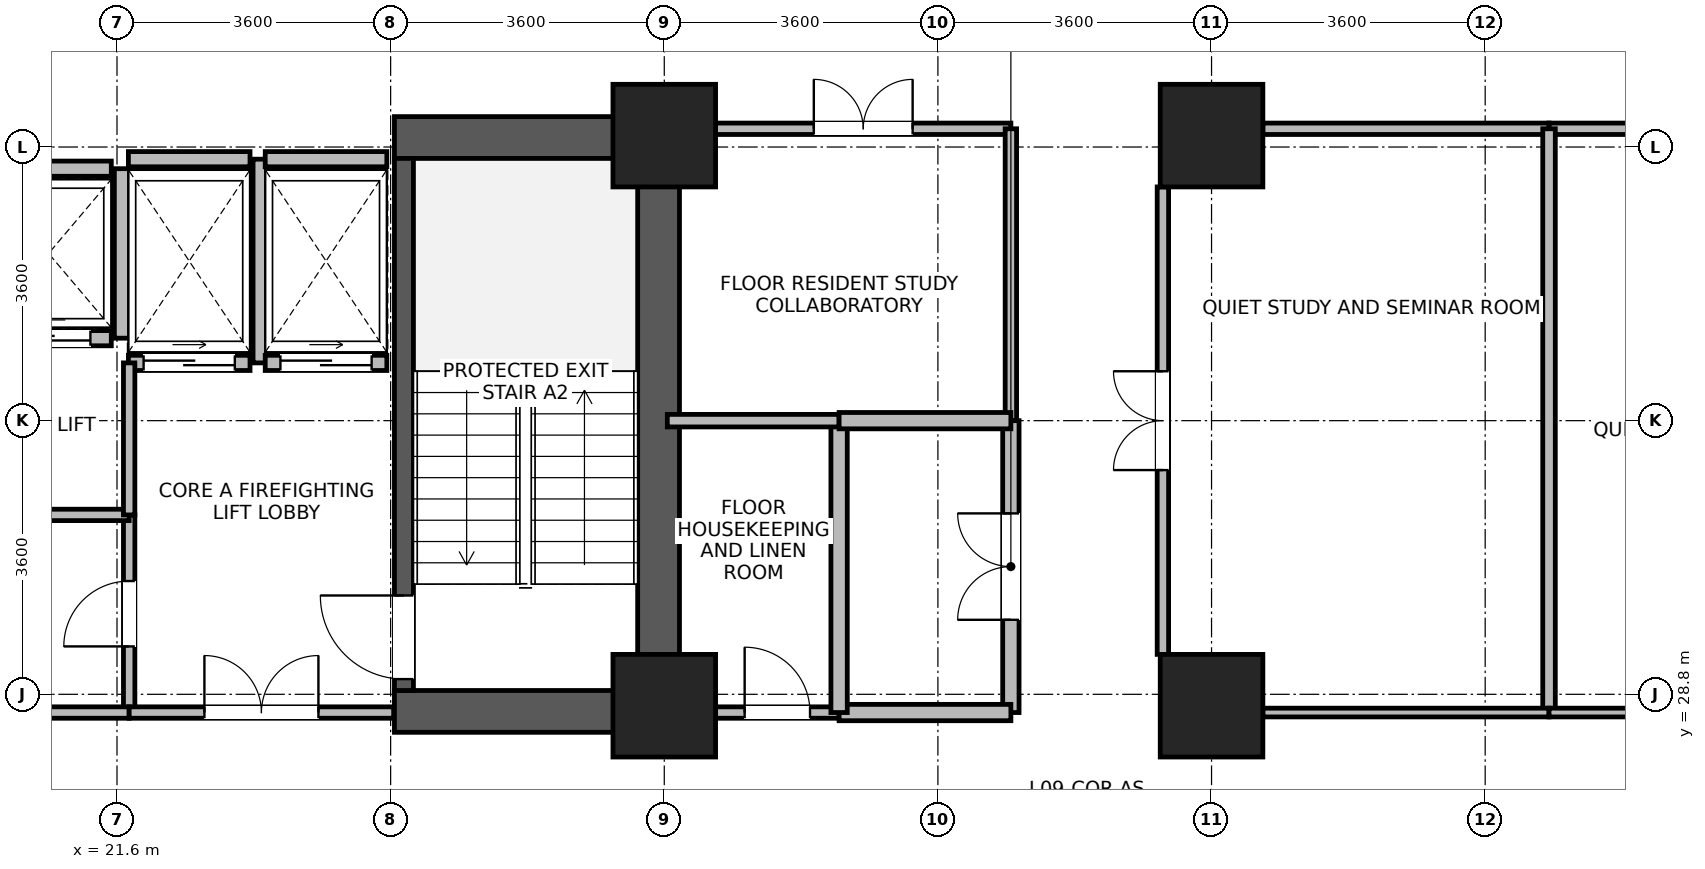
"""IFC4 building model, lengths in metres.
Left out: names, types, materials, properties, quantities, classifications, styles, units other than length and angle.
Written with IfcOpenShell. Run it as: python <this file> out.ifc"""

import sys

from ifc_helpers import new_model, si_unit, direction, frame, frame_2d, origin, origin_2d, place, context, subcontext, project, spatial, rectangle, extrude, source, transform, mapped, element, fill, save


model = new_model("IFC4")
c1 = context("Model", 3, precision=1e-05, world=origin(), true_north=direction((0.0, 1.0)))
c2 = subcontext(c1, "Body", "Model", "MODEL_VIEW")
j1 = project(units=[si_unit("LENGTHUNIT", "METRE"), si_unit("PLANEANGLEUNIT", "RADIAN")], contexts=[c1])
p1 = place(None, origin())
s1 = spatial("IfcSite", under=j1, at=p1, CompositionType="ELEMENT")
p2 = place(p1, origin())
s2 = spatial("IfcBuilding", under=s1, at=p2, CompositionType="ELEMENT")
p3 = place(p2, frame((0.0, 0.0, 40.1)))
s3 = spatial("IfcBuildingStorey", under=s2, at=p3, CompositionType="ELEMENT", Elevation=40.1)
p4 = place(p3, frame((28.725, 28.3, 0.0), z_axis=(0.0, 0.0, 1.0), x_axis=(0.0, 1.0, 0.0)))
e1 = element("IfcWall", 1, at=p4, inside=s3, PredefinedType="SHEAR", context=c2, shape_type="SweptSolid", body=[
    extrude(rectangle(XDim=8.1, YDim=0.55, at=frame_2d((4.05, 0.0))), origin(), (0.0, 0.0, 1.0), 3.45),
])
for number, where, z_axis, x_axis in (
    (2, (25.25, 28.575, 0.0), (0.0, 0.0, 1.0), (1.0, 0.0, 0.0)),
    (3, (25.25, 36.125, 0.0), (0.0, 0.0, 1.0), (1.0, 0.0, 0.0)),
):
    element("IfcWall", number, at=place(p3, frame(where, z_axis=z_axis, x_axis=x_axis)), inside=s3, PredefinedType="SHEAR", context=c2, shape_type="SweptSolid", body=[
        extrude(rectangle(XDim=3.2, YDim=0.55, at=frame_2d((1.6, 0.0))), origin(), (0.0, 0.0, 1.0), 3.45),
    ])
p5 = place(p3, frame((25.375, 28.85, 0.0), z_axis=(0.0, 0.0, 1.0), x_axis=(0.0, 1.0, 0.0)))
e4 = element("IfcWall", 4, at=p5, inside=s3, PredefinedType="SHEAR", context=c2, shape_type="SweptSolid", body=[
    extrude(rectangle(XDim=7.0, YDim=0.25, at=frame_2d((3.5, 0.0))), origin(), (0.0, 0.0, 1.0), 3.45),
])
p6 = place(p5, frame((0.15, 0.0, 0.0)))
e5 = element("IfcOpeningElement", 5, at=p6, cuts=e4, PredefinedType="OPENING", context=c2, shape_type="SweptSolid", body=[
    extrude(rectangle(XDim=1.1, YDim=2.08, at=frame_2d((0.55, 1.04))), frame((0.0, 0.135, 0.0), z_axis=(0.0, -1.0, 0.0), x_axis=(1.0, 0.0, 0.0)), (0.0, 0.0, 1.0), 0.27),
])
m1 = source(origin(), c2, "Body", "SweptSolid", [
    extrude(rectangle(XDim=1.35, YDim=1.35, at=origin_2d()), origin(), (0.0, 0.0, 1.0), 3.7),
])
for number, where, z_axis, x_axis in (
    (6, (28.8, 28.65, 0.0), (0.0, 0.0, 1.0), (1.0, 0.0, 0.0)),
    (7, (28.8, 36.15, 0.0), (0.0, 0.0, 1.0), (1.0, 0.0, 0.0)),
    (8, (36.0, 28.65, 0.0), (0.0, 0.0, 1.0), (1.0, 0.0, 0.0)),
    (9, (36.0, 36.15, 0.0), (0.0, 0.0, 1.0), (1.0, 0.0, 0.0)),
):
    element("IfcColumn", number, at=place(p3, frame(where, z_axis=z_axis, x_axis=x_axis)), inside=s3, PredefinedType="COLUMN", context=c2, shape_type="MappedRepresentation", body=[
        mapped(m1, transform((0.0, 0.0, 0.0), x_axis=(1.0, 0.0, 0.0), y_axis=(0.0, 1.0, 0.0), z_axis=(0.0, 0.0, 1.0), scale=1.0)),
    ])
p7 = place(p3, frame((19.875, 33.485, 0.0), z_axis=(0.0, 0.0, 1.0), x_axis=(1.0, 0.0, 0.0)))
e10 = element("IfcWall", 10, at=p7, inside=s3, PredefinedType="PARTITIONING", context=c2, shape_type="SweptSolid", body=[
    extrude(rectangle(XDim=1.65, YDim=0.2, at=frame_2d((0.825, 0.0))), origin(), (0.0, 0.0, 1.0), 3.43),
])
p8 = place(p7, frame((0.275, 0.0, 0.0)))
e11 = element("IfcOpeningElement", 11, at=p8, cuts=e10, PredefinedType="OPENING", context=c2, shape_type="SweptSolid", body=[
    extrude(rectangle(XDim=1.1, YDim=2.12, at=frame_2d((0.55, 1.06))), frame((0.0, 0.11, 0.0), z_axis=(0.0, -1.0, 0.0), x_axis=(1.0, 0.0, 0.0)), (0.0, 0.0, 1.0), 0.22),
])
p9 = place(p3, frame((19.875, 35.715, 0.0), z_axis=(0.0, 0.0, 1.0), x_axis=(1.0, 0.0, 0.0)))
e12 = element("IfcWall", 12, at=p9, inside=s3, PredefinedType="PARTITIONING", context=c2, shape_type="SweptSolid", body=[
    extrude(rectangle(XDim=1.65, YDim=0.2, at=frame_2d((0.825, 0.0))), origin(), (0.0, 0.0, 1.0), 2.23),
])
p10 = place(p3, frame((21.665, 33.485, 0.0), z_axis=(0.0, 0.0, 1.0), x_axis=(0.0, 1.0, 0.0)))
e13 = element("IfcWall", 13, at=p10, inside=s3, PredefinedType="PARTITIONING", context=c2, shape_type="SweptSolid", body=[
    extrude(rectangle(XDim=2.23, YDim=0.2, at=frame_2d((1.115, 0.0))), origin(), (0.0, 0.0, 1.0), 3.43),
])
p11 = place(p3, frame((21.75, 33.16, 0.0), z_axis=(0.0, 0.0, 1.0), x_axis=(1.0, 0.0, 0.0)))
e14 = element("IfcWall", 14, at=p11, inside=s3, PredefinedType="PARTITIONING", context=c2, shape_type="SweptSolid", body=[
    extrude(rectangle(XDim=1.6, YDim=0.2, at=frame_2d((0.8, 0.0))), origin(), (0.0, 0.0, 1.0), 3.43),
])
p12 = place(p11, frame((0.2, 0.0, 0.0)))
e15 = element("IfcOpeningElement", 15, at=p12, cuts=e14, PredefinedType="OPENING", context=c2, shape_type="SweptSolid", body=[
    extrude(rectangle(XDim=1.2, YDim=2.12, at=frame_2d((0.6, 1.06))), frame((0.0, 0.11, 0.0), z_axis=(0.0, -1.0, 0.0), x_axis=(1.0, 0.0, 0.0)), (0.0, 0.0, 1.0), 0.22),
])
p13 = place(p3, frame((21.75, 35.84, 0.0), z_axis=(0.0, 0.0, 1.0), x_axis=(1.0, 0.0, 0.0)))
e16 = element("IfcWall", 16, at=p13, inside=s3, PredefinedType="PARTITIONING", context=c2, shape_type="SweptSolid", body=[
    extrude(rectangle(XDim=1.6, YDim=0.2, at=frame_2d((0.8, 0.0))), origin(), (0.0, 0.0, 1.0), 2.23),
])
p14 = place(p3, frame((23.49, 33.16, 0.0), z_axis=(0.0, 0.0, 1.0), x_axis=(0.0, 1.0, 0.0)))
e17 = element("IfcWall", 17, at=p14, inside=s3, PredefinedType="PARTITIONING", context=c2, shape_type="SweptSolid", body=[
    extrude(rectangle(XDim=2.68, YDim=0.2, at=frame_2d((1.34, 0.0))), origin(), (0.0, 0.0, 1.0), 3.43),
])
p15 = place(p3, frame((23.55, 33.16, 0.0), z_axis=(0.0, 0.0, 1.0), x_axis=(1.0, 0.0, 0.0)))
e18 = element("IfcWall", 18, at=p15, inside=s3, PredefinedType="PARTITIONING", context=c2, shape_type="SweptSolid", body=[
    extrude(rectangle(XDim=1.6, YDim=0.2, at=frame_2d((0.8, 0.0))), origin(), (0.0, 0.0, 1.0), 3.43),
])
p16 = place(p15, frame((0.2, 0.0, 0.0)))
e19 = element("IfcOpeningElement", 19, at=p16, cuts=e18, PredefinedType="OPENING", context=c2, shape_type="SweptSolid", body=[
    extrude(rectangle(XDim=1.2, YDim=2.12, at=frame_2d((0.6, 1.06))), frame((0.0, 0.11, 0.0), z_axis=(0.0, -1.0, 0.0), x_axis=(1.0, 0.0, 0.0)), (0.0, 0.0, 1.0), 0.22),
])
p17 = place(p3, frame((23.55, 35.84, 0.0), z_axis=(0.0, 0.0, 1.0), x_axis=(1.0, 0.0, 0.0)))
e20 = element("IfcWall", 20, at=p17, inside=s3, PredefinedType="PARTITIONING", context=c2, shape_type="SweptSolid", body=[
    extrude(rectangle(XDim=1.6, YDim=0.2, at=frame_2d((0.8, 0.0))), origin(), (0.0, 0.0, 1.0), 2.23),
])
p18 = place(p3, frame((35.36, 29.325, 0.0), z_axis=(0.0, 0.0, 1.0), x_axis=(0.0, 1.0, 0.0)))
e21 = element("IfcWall", 21, at=p18, inside=s3, PredefinedType="PARTITIONING", context=c2, shape_type="SweptSolid", body=[
    extrude(rectangle(XDim=6.15, YDim=0.15, at=frame_2d((3.075, 0.0))), origin(), (0.0, 0.0, 1.0), 3.43),
])
p19 = place(p18, frame((2.425, 0.0, 0.0)))
e22 = element("IfcOpeningElement", 22, at=p19, cuts=e21, PredefinedType="OPENING", context=c2, shape_type="SweptSolid", body=[
    extrude(rectangle(XDim=1.3, YDim=2.12, at=frame_2d((0.65, 1.06))), frame((0.0, 0.085, 0.0), z_axis=(0.0, -1.0, 0.0), x_axis=(1.0, 0.0, 0.0)), (0.0, 0.0, 1.0), 0.17),
])
p20 = place(p3, frame((36.675, 36.24, 0.0), z_axis=(0.0, 0.0, 1.0), x_axis=(1.0, 0.0, 0.0)))
e23 = element("IfcWall", 23, at=p20, inside=s3, PredefinedType="PARTITIONING", context=c2, shape_type="SweptSolid", body=[
    extrude(rectangle(XDim=3.765, YDim=0.15, at=frame_2d((1.882, 0.0))), origin(), (0.0, 0.0, 1.0), 2.78),
])
p21 = place(p3, frame((40.44, 36.24, 0.0), z_axis=(0.0, 0.0, 1.0), x_axis=(1.0, 0.0, 0.0)))
e24 = element("IfcWall", 24, at=p21, inside=s3, PredefinedType="PARTITIONING", context=c2, shape_type="SweptSolid", body=[
    extrude(rectangle(XDim=4.72, YDim=0.15, at=frame_2d((2.36, 0.0))), origin(), (0.0, 0.0, 1.0), 2.78),
])
p22 = place(p21, frame((1.71, 0.0, 0.0)))
e25 = element("IfcOpeningElement", 25, at=p22, cuts=e24, PredefinedType="OPENING", context=c2, shape_type="SweptSolid", body=[
    extrude(rectangle(XDim=1.3, YDim=2.12, at=frame_2d((0.65, 1.06))), frame((0.0, 0.085, 0.0), z_axis=(0.0, -1.0, 0.0), x_axis=(1.0, 0.0, 0.0)), (0.0, 0.0, 1.0), 0.17),
])
p23 = place(p3, frame((29.475, 36.24, 0.0), z_axis=(0.0, 0.0, 1.0), x_axis=(1.0, 0.0, 0.0)))
e26 = element("IfcWall", 26, at=p23, inside=s3, PredefinedType="PARTITIONING", context=c2, shape_type="SweptSolid", body=[
    extrude(rectangle(XDim=3.885, YDim=0.15, at=frame_2d((1.942, 0.0))), origin(), (0.0, 0.0, 1.0), 2.78),
])
p24 = place(p23, frame((1.292, 0.0, 0.0)))
e27 = element("IfcOpeningElement", 27, at=p24, cuts=e26, PredefinedType="OPENING", context=c2, shape_type="SweptSolid", body=[
    extrude(rectangle(XDim=1.3, YDim=2.12, at=frame_2d((0.65, 1.06))), frame((0.0, 0.085, 0.0), z_axis=(0.0, -1.0, 0.0), x_axis=(1.0, 0.0, 0.0)), (0.0, 0.0, 1.0), 0.17),
])
p25 = place(p3, frame((33.36, 32.4, 0.0), z_axis=(0.0, 0.0, 1.0), x_axis=(0.0, 1.0, 0.0)))
e28 = element("IfcWall", 28, at=p25, inside=s3, PredefinedType="PARTITIONING", context=c2, shape_type="SweptSolid", body=[
    extrude(rectangle(XDim=3.84, YDim=0.15, at=frame_2d((1.92, 0.0))), origin(), (0.0, 0.0, 1.0), 3.43),
])
p26 = place(p3, frame((33.36, 28.56, 0.0), z_axis=(0.0, 0.0, 1.0), x_axis=(0.0, 1.0, 0.0)))
e29 = element("IfcWall", 29, at=p26, inside=s3, PredefinedType="PARTITIONING", context=c2, shape_type="SweptSolid", body=[
    extrude(rectangle(XDim=3.84, YDim=0.215, at=frame_2d((1.92, 0.0))), origin(), (0.0, 0.0, 1.0), 3.43),
])
p27 = place(p26, frame((1.22, 0.0, 0.0)))
e30 = element("IfcOpeningElement", 30, at=p27, cuts=e29, PredefinedType="OPENING", context=c2, shape_type="SweptSolid", body=[
    extrude(rectangle(XDim=1.4, YDim=2.15, at=frame_2d((0.7, 1.075))), frame((0.0, 0.118, 0.0), z_axis=(0.0, -1.0, 0.0), x_axis=(1.0, 0.0, 0.0)), (0.0, 0.0, 1.0), 0.235),
])
p28 = place(p3, frame((21.76, 28.56, 0.0), z_axis=(0.0, 0.0, 1.0), x_axis=(0.0, 1.0, 0.0)))
e31 = element("IfcWall", 31, at=p28, inside=s3, PredefinedType="PARTITIONING", context=c2, shape_type="SweptSolid", body=[
    extrude(rectangle(XDim=2.6, YDim=0.15, at=frame_2d((1.3, 0.0))), origin(), (0.0, 0.0, 1.0), 3.43),
])
p29 = place(p28, frame((0.87, 0.0, 0.0)))
e32 = element("IfcOpeningElement", 32, at=p29, cuts=e31, PredefinedType="OPENING", context=c2, shape_type="SweptSolid", body=[
    extrude(rectangle(XDim=0.86, YDim=2.02, at=frame_2d((0.43, 1.01))), frame((0.0, 0.085, 0.0), z_axis=(0.0, -1.0, 0.0), x_axis=(1.0, 0.0, 0.0)), (0.0, 0.0, 1.0), 0.17),
])
p30 = place(p3, frame((29.475, 28.56, 0.0), z_axis=(0.0, 0.0, 1.0), x_axis=(1.0, 0.0, 0.0)))
e33 = element("IfcWall", 33, at=p30, inside=s3, PredefinedType="PARTITIONING", context=c2, shape_type="SweptSolid", body=[
    extrude(rectangle(XDim=1.625, YDim=0.15, at=frame_2d((0.812, 0.0))), origin(), (0.0, 0.0, 1.0), 2.78),
])
p31 = place(p30, frame((0.383, 0.0, 0.0)))
e34 = element("IfcOpeningElement", 34, at=p31, cuts=e33, PredefinedType="OPENING", context=c2, shape_type="SweptSolid", body=[
    extrude(rectangle(XDim=0.86, YDim=2.02, at=frame_2d((0.43, 1.01))), frame((0.0, 0.085, 0.0), z_axis=(0.0, -1.0, 0.0), x_axis=(1.0, 0.0, 0.0)), (0.0, 0.0, 1.0), 0.17),
])
p32 = place(p3, frame((31.1, 28.56, 0.0), z_axis=(0.0, 0.0, 1.0), x_axis=(1.0, 0.0, 0.0)))
e35 = element("IfcWall", 35, at=p32, inside=s3, PredefinedType="PARTITIONING", context=c2, shape_type="SweptSolid", body=[
    extrude(rectangle(XDim=2.26, YDim=0.215, at=frame_2d((1.13, 0.0))), origin(), (0.0, 0.0, 1.0), 2.78),
])
p33 = place(p3, frame((20.56, 28.56, 0.0), z_axis=(0.0, 0.0, 1.0), x_axis=(1.0, 0.0, 0.0)))
e36 = element("IfcWall", 36, at=p33, inside=s3, PredefinedType="PARTITIONING", context=c2, shape_type="SweptSolid", body=[
    extrude(rectangle(XDim=1.2, YDim=0.15, at=frame_2d((0.6, 0.0))), origin(), (0.0, 0.0, 1.0), 2.23),
])
p34 = place(p3, frame((20.56, 31.16, 0.0), z_axis=(0.0, 0.0, 1.0), x_axis=(1.0, 0.0, 0.0)))
e37 = element("IfcWall", 37, at=p34, inside=s3, PredefinedType="PARTITIONING", context=c2, shape_type="SweptSolid", body=[
    extrude(rectangle(XDim=1.2, YDim=0.15, at=frame_2d((0.6, 0.0))), origin(), (0.0, 0.0, 1.0), 3.43),
])
p35 = place(p3, frame((40.44, 28.56, 0.0), z_axis=(0.0, 0.0, 1.0), x_axis=(0.0, 1.0, 0.0)))
e38 = element("IfcWall", 38, at=p35, inside=s3, PredefinedType="PARTITIONING", context=c2, shape_type="SweptSolid", body=[
    extrude(rectangle(XDim=7.68, YDim=0.165, at=frame_2d((3.84, 0.0))), origin(), (0.0, 0.0, 1.0), 3.43),
])
p36 = place(p3, frame((36.675, 28.56, 0.0), z_axis=(0.0, 0.0, 1.0), x_axis=(1.0, 0.0, 0.0)))
e39 = element("IfcWall", 39, at=p36, inside=s3, PredefinedType="PARTITIONING", context=c2, shape_type="SweptSolid", body=[
    extrude(rectangle(XDim=3.765, YDim=0.115, at=frame_2d((1.882, 0.0))), origin(), (0.0, 0.0, 1.0), 2.78),
])
p37 = place(p3, frame((40.44, 28.56, 0.0), z_axis=(0.0, 0.0, 1.0), x_axis=(1.0, 0.0, 0.0)))
e40 = element("IfcWall", 40, at=p37, inside=s3, PredefinedType="PARTITIONING", context=c2, shape_type="SweptSolid", body=[
    extrude(rectangle(XDim=4.72, YDim=0.115, at=frame_2d((2.36, 0.0))), origin(), (0.0, 0.0, 1.0), 2.78),
])
p38 = place(p3, frame((31.1, 28.56, 0.0), z_axis=(0.0, 0.0, 1.0), x_axis=(0.0, 1.0, 0.0)))
e41 = element("IfcWall", 41, at=p38, inside=s3, PredefinedType="PARTITIONING", context=c2, shape_type="SweptSolid", body=[
    extrude(rectangle(XDim=3.84, YDim=0.215, at=frame_2d((1.92, 0.0))), origin(), (0.0, 0.0, 1.0), 3.43),
])
p39 = place(p3, frame((21.76, 28.56, 0.0), z_axis=(0.0, 0.0, 1.0), x_axis=(1.0, 0.0, 0.0)))
e42 = element("IfcWall", 42, at=p39, inside=s3, PredefinedType="PARTITIONING", context=c2, shape_type="SweptSolid", body=[
    extrude(rectangle(XDim=3.48, YDim=0.15, at=frame_2d((1.74, 0.0))), origin(), (0.0, 0.0, 1.0), 2.23),
])
p40 = place(p39, frame((0.99, 0.0, 0.0)))
e43 = element("IfcOpeningElement", 43, at=p40, cuts=e42, PredefinedType="OPENING", context=c2, shape_type="SweptSolid", body=[
    extrude(rectangle(XDim=1.5, YDim=2.1, at=frame_2d((0.75, 1.05))), frame((0.0, 0.085, 0.0), z_axis=(0.0, -1.0, 0.0), x_axis=(1.0, 0.0, 0.0)), (0.0, 0.0, 1.0), 0.17),
])
p41 = place(p3, frame((28.84, 32.4, 0.0), z_axis=(0.0, 0.0, 1.0), x_axis=(1.0, 0.0, 0.0)))
e44 = element("IfcWall", 44, at=p41, inside=s3, PredefinedType="PARTITIONING", context=c2, shape_type="SweptSolid", body=[
    extrude(rectangle(XDim=2.26, YDim=0.165, at=frame_2d((1.13, 0.0))), origin(), (0.0, 0.0, 1.0), 3.43),
])
p42 = place(p3, frame((31.1, 32.4, 0.0), z_axis=(0.0, 0.0, 1.0), x_axis=(1.0, 0.0, 0.0)))
e45 = element("IfcWall", 45, at=p42, inside=s3, PredefinedType="PARTITIONING", context=c2, shape_type="SweptSolid", body=[
    extrude(rectangle(XDim=2.26, YDim=0.215, at=frame_2d((1.13, 0.0))), origin(), (0.0, 0.0, 1.0), 3.43),
])
p43 = place(p3, frame((21.76, 31.16, 0.0), z_axis=(0.0, 0.0, 1.0), x_axis=(0.0, 1.0, 0.0)))
e46 = element("IfcWall", 46, at=p43, inside=s3, PredefinedType="PARTITIONING", context=c2, shape_type="SweptSolid", body=[
    extrude(rectangle(XDim=2.0, YDim=0.15, at=frame_2d((1.0, 0.0))), origin(), (0.0, 0.0, 1.0), 3.43),
])
p44 = place(p6, origin())
e47 = element("IfcDoor", 47, at=p44, inside=s3, OperationType="SINGLE_SWING_RIGHT", PredefinedType="DOOR", context=c2, shape_type="SweptSolid", body=[
    extrude(rectangle(XDim=1.1, YDim=2.08, at=frame_2d((0.55, 1.04))), frame((0.0, 0.025, 0.0), z_axis=(0.0, -1.0, 0.0), x_axis=(1.0, 0.0, 0.0)), (0.0, 0.0, 1.0), 0.05),
])
fill(e5, e47)
p45 = place(p8, origin())
e48 = element("IfcDoor", 48, at=p45, inside=s3, OperationType="SLIDING_TO_LEFT", PredefinedType="DOOR", context=c2, shape_type="SweptSolid", body=[
    extrude(rectangle(XDim=1.1, YDim=2.12, at=frame_2d((0.55, 1.06))), frame((0.0, 0.025, 0.0), z_axis=(0.0, -1.0, 0.0), x_axis=(1.0, 0.0, 0.0)), (0.0, 0.0, 1.0), 0.05),
])
fill(e11, e48)
p46 = place(p12, origin())
e49 = element("IfcDoor", 49, at=p46, inside=s3, OperationType="SLIDING_TO_RIGHT", PredefinedType="DOOR", context=c2, shape_type="SweptSolid", body=[
    extrude(rectangle(XDim=1.2, YDim=2.12, at=frame_2d((0.6, 1.06))), frame((0.0, 0.025, 0.0), z_axis=(0.0, -1.0, 0.0), x_axis=(1.0, 0.0, 0.0)), (0.0, 0.0, 1.0), 0.05),
])
fill(e15, e49)
p47 = place(p16, origin())
e50 = element("IfcDoor", 50, at=p47, inside=s3, OperationType="SLIDING_TO_RIGHT", PredefinedType="DOOR", context=c2, shape_type="SweptSolid", body=[
    extrude(rectangle(XDim=1.2, YDim=2.12, at=frame_2d((0.6, 1.06))), frame((0.0, 0.025, 0.0), z_axis=(0.0, -1.0, 0.0), x_axis=(1.0, 0.0, 0.0)), (0.0, 0.0, 1.0), 0.05),
])
fill(e19, e50)
p48 = place(p19, origin())
e51 = element("IfcDoor", 51, at=p48, inside=s3, OperationType="DOUBLE_DOOR_SINGLE_SWING", PredefinedType="DOOR", context=c2, shape_type="SweptSolid", body=[
    extrude(rectangle(XDim=1.3, YDim=2.12, at=frame_2d((0.65, 1.06))), frame((0.0, 0.025, 0.0), z_axis=(0.0, -1.0, 0.0), x_axis=(1.0, 0.0, 0.0)), (0.0, 0.0, 1.0), 0.05),
])
fill(e22, e51)
p49 = place(p24, origin())
e52 = element("IfcDoor", 52, at=p49, inside=s3, OperationType="DOUBLE_DOOR_SINGLE_SWING", PredefinedType="DOOR", context=c2, shape_type="SweptSolid", body=[
    extrude(rectangle(XDim=1.3, YDim=2.12, at=frame_2d((0.65, 1.06))), frame((0.0, 0.025, 0.0), z_axis=(0.0, -1.0, 0.0), x_axis=(1.0, 0.0, 0.0)), (0.0, 0.0, 1.0), 0.05),
])
fill(e27, e52)
p50 = place(p27, origin())
e53 = element("IfcDoor", 53, at=p50, inside=s3, OperationType="DOUBLE_DOOR_SINGLE_SWING", PredefinedType="DOOR", context=c2, shape_type="SweptSolid", body=[
    extrude(rectangle(XDim=1.4, YDim=2.15, at=frame_2d((0.7, 1.075))), frame((0.0, 0.025, 0.0), z_axis=(0.0, -1.0, 0.0), x_axis=(1.0, 0.0, 0.0)), (0.0, 0.0, 1.0), 0.05),
])
fill(e30, e53)
p51 = place(p29, origin())
e54 = element("IfcDoor", 54, at=p51, inside=s3, OperationType="SINGLE_SWING_LEFT", PredefinedType="DOOR", context=c2, shape_type="SweptSolid", body=[
    extrude(rectangle(XDim=0.86, YDim=2.02, at=frame_2d((0.43, 1.01))), frame((0.0, 0.025, 0.0), z_axis=(0.0, -1.0, 0.0), x_axis=(1.0, 0.0, 0.0)), (0.0, 0.0, 1.0), 0.05),
])
fill(e32, e54)
p52 = place(p31, origin())
e55 = element("IfcDoor", 55, at=p52, inside=s3, OperationType="SINGLE_SWING_LEFT", PredefinedType="DOOR", context=c2, shape_type="SweptSolid", body=[
    extrude(rectangle(XDim=0.86, YDim=2.02, at=frame_2d((0.43, 1.01))), frame((0.0, 0.025, 0.0), z_axis=(0.0, -1.0, 0.0), x_axis=(1.0, 0.0, 0.0)), (0.0, 0.0, 1.0), 0.05),
])
fill(e34, e55)
p53 = place(p40, origin())
e56 = element("IfcDoor", 56, at=p53, inside=s3, OperationType="DOUBLE_DOOR_SINGLE_SWING", PredefinedType="DOOR", context=c2, shape_type="SweptSolid", body=[
    extrude(rectangle(XDim=1.5, YDim=2.1, at=frame_2d((0.75, 1.05))), frame((0.0, 0.025, 0.0), z_axis=(0.0, -1.0, 0.0), x_axis=(1.0, 0.0, 0.0)), (0.0, 0.0, 1.0), 0.05),
])
fill(e43, e56)
save(model, sys.argv[1])
